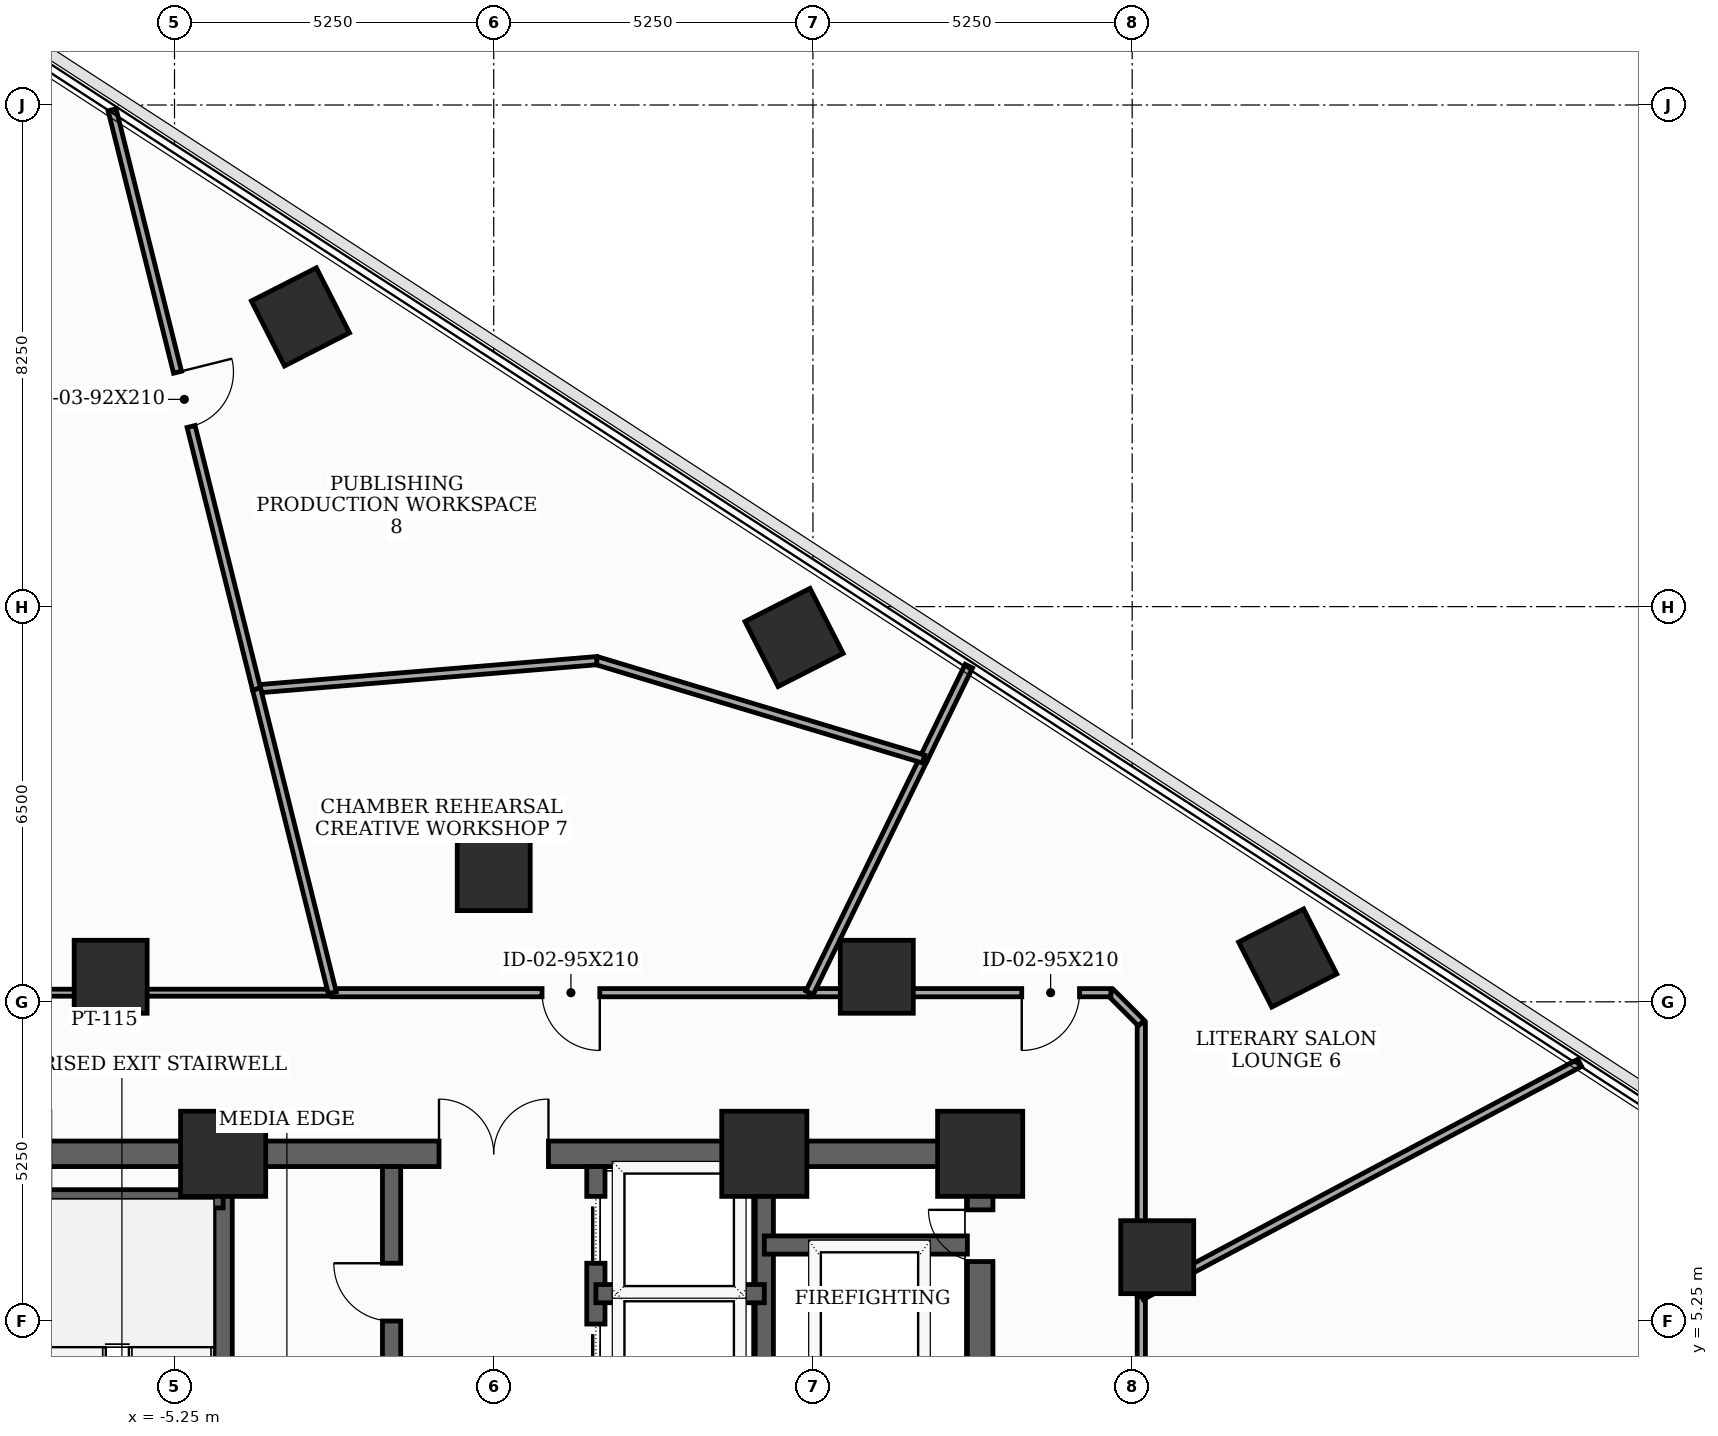
"""IFC4 building model, lengths in metres.
Left out: names, types, materials, properties, quantities, classifications, styles, units other than length and angle.
Written with IfcOpenShell. Run it as: python <this file> out.ifc"""

import sys

from ifc_helpers import new_model, si_unit, direction, frame, frame_2d, origin, origin_2d, place, context, subcontext, project, spatial, rectangle, extrude, element, fill, save


model = new_model("IFC4")
c1 = context("Model", 3, precision=1e-05, world=origin(), true_north=direction((0.0, 1.0)))
c2 = subcontext(c1, "Body", "Model", "MODEL_VIEW")
j1 = project(units=[si_unit("LENGTHUNIT", "METRE"), si_unit("PLANEANGLEUNIT", "RADIAN")], contexts=[c1])
p1 = place(None, origin())
s1 = spatial("IfcSite", under=j1, at=p1, CompositionType="ELEMENT")
p2 = place(p1, origin())
s2 = spatial("IfcBuilding", under=s1, at=p2, CompositionType="ELEMENT")
p3 = place(p2, frame((0.0, 0.0, 131.0)))
s3 = spatial("IfcBuildingStorey", under=s2, at=p3, CompositionType="ELEMENT", Elevation=131.0)
for number, where, z_axis, x_axis in (
    (1, (8.0, 8.0, 0.0), (0.0, 0.0, 1.0), (1.0, 0.0, 0.0)),
    (2, (4.45, 8.0, 0.0), (0.0, 0.0, 1.0), (1.0, 0.0, 0.0)),
    (3, (-4.45, 8.0, 0.0), (0.0, 0.0, 1.0), (1.0, 0.0, 0.0)),
):
    element("IfcColumn", number, at=place(p3, frame(where, z_axis=z_axis, x_axis=x_axis)), inside=s3, PredefinedType="COLUMN", context=c2, shape_type="SweptSolid", body=[
        extrude(rectangle(XDim=1.4, YDim=1.4, at=origin_2d()), origin(), (0.0, 0.0, 1.0), 3.7),
    ])
for number, where, z_axis, x_axis in (
    (4, (10.912, 6.3, 0.0), (0.0, 0.0, 1.0), (1.0, 0.0, 0.0)),
    (5, (6.3, 10.912, 0.0), (0.0, 0.0, 1.0), (1.0, 0.0, 0.0)),
    (6, (0.0, 12.6, 0.0), (0.0, 0.0, 1.0), (1.0, 0.0, 0.0)),
    (7, (-6.3, 10.912, 0.0), (0.0, 0.0, 1.0), (1.0, 0.0, 0.0)),
    (8, (13.058, 11.22, 0.0), (0.0, 0.0, 1.0), (0.891, 0.454, 0.0)),
    (9, (4.939, 16.492, 0.0), (0.0, 0.0, 1.0), (0.891, 0.454, 0.0)),
    (10, (-3.179, 21.765, 0.0), (0.0, 0.0, 1.0), (0.891, 0.454, 0.0)),
):
    element("IfcColumn", number, at=place(p3, frame(where, z_axis=z_axis, x_axis=x_axis)), inside=s3, PredefinedType="COLUMN", context=c2, shape_type="SweptSolid", body=[
        extrude(rectangle(XDim=1.2, YDim=1.2, at=origin_2d()), origin(), (0.0, 0.0, 1.0), 3.7),
    ])
p4 = place(p3, frame((8.0, -8.0, 0.0), z_axis=(0.0, 0.0, 1.0), x_axis=(0.0, 1.0, 0.0)))
e11 = element("IfcWall", 11, at=p4, inside=s3, PredefinedType="SHEAR", context=c2, shape_type="SweptSolid", body=[
    extrude(rectangle(XDim=16.0, YDim=0.42, at=frame_2d((8.0, 0.0))), origin(), (0.0, 0.0, 1.0), 3.5),
])
p5 = place(p4, frame((9.6, 0.0, 0.0)))
e12 = element("IfcOpeningElement", 12, at=p5, cuts=e11, PredefinedType="OPENING", context=c2, shape_type="SweptSolid", body=[
    extrude(rectangle(XDim=1.05, YDim=2.15, at=frame_2d((0.525, 1.075))), frame((0.0, 0.22, 0.0), z_axis=(0.0, -1.0, 0.0), x_axis=(1.0, 0.0, 0.0)), (0.0, 0.0, 1.0), 0.44),
])
p6 = place(p4, frame((14.229, 0.0, 0.0)))
e13 = element("IfcOpeningElement", 13, at=p6, cuts=e11, PredefinedType="OPENING", context=c2, shape_type="SweptSolid", body=[
    extrude(rectangle(XDim=0.85, YDim=2.02, at=frame_2d((0.425, 1.01))), frame((0.0, 0.22, 0.0), z_axis=(0.0, -1.0, 0.0), x_axis=(1.0, 0.0, 0.0)), (0.0, 0.0, 1.0), 0.44),
])
p7 = place(p3, frame((-8.0, 8.0, 0.0), z_axis=(0.0, 0.0, 1.0), x_axis=(1.0, 0.0, 0.0)))
e14 = element("IfcWall", 14, at=p7, inside=s3, PredefinedType="SHEAR", context=c2, shape_type="SweptSolid", body=[
    extrude(rectangle(XDim=16.0, YDim=0.42, at=frame_2d((8.0, 0.0))), origin(), (0.0, 0.0, 1.0), 3.5),
])
p8 = place(p7, frame((7.1, 0.0, 0.0)))
e15 = element("IfcOpeningElement", 15, at=p8, cuts=e14, PredefinedType="OPENING", context=c2, shape_type="SweptSolid", body=[
    extrude(rectangle(XDim=1.8, YDim=2.15, at=frame_2d((0.9, 1.075))), frame((0.0, 0.22, 0.0), z_axis=(0.0, -1.0, 0.0), x_axis=(1.0, 0.0, 0.0)), (0.0, 0.0, 1.0), 0.44),
])
for number, where, z_axis, x_axis in (
    (16, (-4.45, -7.79, 0.0), (0.0, 0.0, 1.0), (0.0, 1.0, 0.0)),
    (17, (4.45, -7.79, 0.0), (0.0, 0.0, 1.0), (0.0, 1.0, 0.0)),
):
    element("IfcWall", number, at=place(p3, frame(where, z_axis=z_axis, x_axis=x_axis)), inside=s3, PredefinedType="SHEAR", context=c2, shape_type="SweptSolid", body=[
        extrude(rectangle(XDim=15.58, YDim=0.3, at=frame_2d((7.79, 0.0))), origin(), (0.0, 0.0, 1.0), 3.5),
    ])
for number, where, z_axis, x_axis in (
    (18, (-7.79, 7.26, 0.0), (0.0, 0.0, 1.0), (1.0, 0.0, 0.0)),
    (19, (4.45, 6.5, 0.0), (0.0, 0.0, 1.0), (1.0, 0.0, 0.0)),
):
    element("IfcWall", number, at=place(p3, frame(where, z_axis=z_axis, x_axis=x_axis)), inside=s3, PredefinedType="SHEAR", context=c2, shape_type="SweptSolid", body=[
        extrude(rectangle(XDim=3.34, YDim=0.3, at=frame_2d((1.67, 0.0))), origin(), (0.0, 0.0, 1.0), 3.5),
    ])
p9 = place(p3, frame((-1.68, -4.85, 0.0), z_axis=(0.0, 0.0, 1.0), x_axis=(0.0, 1.0, 0.0)))
e20 = element("IfcWall", 20, at=p9, inside=s3, PredefinedType="SHEAR", context=c2, shape_type="SweptSolid", body=[
    extrude(rectangle(XDim=12.64, YDim=0.3, at=frame_2d((6.32, 0.0))), origin(), (0.0, 0.0, 1.0), 3.5),
])
p10 = place(p9, frame((1.65, 0.0, 0.0)))
e21 = element("IfcOpeningElement", 21, at=p10, cuts=e20, PredefinedType="OPENING", context=c2, shape_type="SweptSolid", body=[
    extrude(rectangle(XDim=0.95, YDim=2.1, at=frame_2d((0.475, 1.05))), frame((0.0, 0.16, 0.0), z_axis=(0.0, -1.0, 0.0), x_axis=(1.0, 0.0, 0.0)), (0.0, 0.0, 1.0), 0.32),
])
p11 = place(p9, frame((5.9, 0.0, 0.0)))
e22 = element("IfcOpeningElement", 22, at=p11, cuts=e20, PredefinedType="OPENING", context=c2, shape_type="SweptSolid", body=[
    extrude(rectangle(XDim=0.95, YDim=2.1, at=frame_2d((0.475, 1.05))), frame((0.0, 0.16, 0.0), z_axis=(0.0, -1.0, 0.0), x_axis=(1.0, 0.0, 0.0)), (0.0, 0.0, 1.0), 0.32),
])
p12 = place(p9, frame((10.1, 0.0, 0.0)))
e23 = element("IfcOpeningElement", 23, at=p12, cuts=e20, PredefinedType="OPENING", context=c2, shape_type="SweptSolid", body=[
    extrude(rectangle(XDim=0.95, YDim=2.1, at=frame_2d((0.475, 1.05))), frame((0.0, 0.16, 0.0), z_axis=(0.0, -1.0, 0.0), x_axis=(1.0, 0.0, 0.0)), (0.0, 0.0, 1.0), 0.32),
])
p13 = place(p3, frame((1.68, -4.85, 0.0), z_axis=(0.0, 0.0, 1.0), x_axis=(0.0, 1.0, 0.0)))
e24 = element("IfcWall", 24, at=p13, inside=s3, PredefinedType="SHEAR", context=c2, shape_type="SweptSolid", body=[
    extrude(rectangle(XDim=12.64, YDim=0.3, at=frame_2d((6.32, 0.0))), origin(), (0.0, 0.0, 1.0), 3.5),
])
p14 = place(p13, frame((0.55, 0.0, 0.0)))
e25 = element("IfcOpeningElement", 25, at=p14, cuts=e24, PredefinedType="OPENING", context=c2, shape_type="SweptSolid", body=[
    extrude(rectangle(XDim=1.1, YDim=2.1, at=frame_2d((0.55, 1.05))), frame((0.0, 0.16, 0.0), z_axis=(0.0, -1.0, 0.0), x_axis=(1.0, 0.0, 0.0)), (0.0, 0.0, 1.0), 0.32),
])
p15 = place(p13, frame((2.65, 0.0, 0.0)))
e26 = element("IfcOpeningElement", 26, at=p15, cuts=e24, PredefinedType="OPENING", context=c2, shape_type="SweptSolid", body=[
    extrude(rectangle(XDim=1.1, YDim=2.1, at=frame_2d((0.55, 1.05))), frame((0.0, 0.16, 0.0), z_axis=(0.0, -1.0, 0.0), x_axis=(1.0, 0.0, 0.0)), (0.0, 0.0, 1.0), 0.32),
])
p16 = place(p13, frame((4.75, 0.0, 0.0)))
e27 = element("IfcOpeningElement", 27, at=p16, cuts=e24, PredefinedType="OPENING", context=c2, shape_type="SweptSolid", body=[
    extrude(rectangle(XDim=1.1, YDim=2.1, at=frame_2d((0.55, 1.05))), frame((0.0, 0.16, 0.0), z_axis=(0.0, -1.0, 0.0), x_axis=(1.0, 0.0, 0.0)), (0.0, 0.0, 1.0), 0.32),
])
p17 = place(p13, frame((6.85, 0.0, 0.0)))
e28 = element("IfcOpeningElement", 28, at=p17, cuts=e24, PredefinedType="OPENING", context=c2, shape_type="SweptSolid", body=[
    extrude(rectangle(XDim=1.1, YDim=2.1, at=frame_2d((0.55, 1.05))), frame((0.0, 0.16, 0.0), z_axis=(0.0, -1.0, 0.0), x_axis=(1.0, 0.0, 0.0)), (0.0, 0.0, 1.0), 0.32),
])
p18 = place(p13, frame((8.95, 0.0, 0.0)))
e29 = element("IfcOpeningElement", 29, at=p18, cuts=e24, PredefinedType="OPENING", context=c2, shape_type="SweptSolid", body=[
    extrude(rectangle(XDim=1.1, YDim=2.1, at=frame_2d((0.55, 1.05))), frame((0.0, 0.16, 0.0), z_axis=(0.0, -1.0, 0.0), x_axis=(1.0, 0.0, 0.0)), (0.0, 0.0, 1.0), 0.32),
])
p19 = place(p13, frame((11.05, 0.0, 0.0)))
e30 = element("IfcOpeningElement", 30, at=p19, cuts=e24, PredefinedType="OPENING", context=c2, shape_type="SweptSolid", body=[
    extrude(rectangle(XDim=1.1, YDim=2.1, at=frame_2d((0.55, 1.05))), frame((0.0, 0.16, 0.0), z_axis=(0.0, -1.0, 0.0), x_axis=(1.0, 0.0, 0.0)), (0.0, 0.0, 1.0), 0.32),
])
p20 = place(p3, frame((1.68, 5.7, 0.0), z_axis=(0.0, 0.0, 1.0), x_axis=(1.0, 0.0, 0.0)))
e31 = element("IfcWall", 31, at=p20, inside=s3, PredefinedType="SHEAR", context=c2, shape_type="SweptSolid", body=[
    extrude(rectangle(XDim=2.77, YDim=0.3, at=frame_2d((1.385, 0.0))), origin(), (0.0, 0.0, 1.0), 3.5),
])
p21 = place(p3, frame((10.65, -10.15, 0.0), z_axis=(0.0, 0.0, 1.0), x_axis=(0.0, 1.0, 0.0)))
e32 = element("IfcWall", 32, at=p21, inside=s3, PredefinedType="PARTITIONING", context=c2, shape_type="SweptSolid", body=[
    extrude(rectangle(XDim=15.813, YDim=0.135, at=frame_2d((7.906, 0.0))), origin(), (0.0, 0.0, 1.0), 2.785),
])
p22 = place(p21, frame((7.431, 0.0, 0.0)))
e33 = element("IfcOpeningElement", 33, at=p22, cuts=e32, PredefinedType="OPENING", context=c2, shape_type="SweptSolid", body=[
    extrude(rectangle(XDim=0.95, YDim=2.1, at=frame_2d((0.475, 1.05))), frame((0.0, 0.077, 0.0), z_axis=(0.0, -1.0, 0.0), x_axis=(1.0, 0.0, 0.0)), (0.0, 0.0, 1.0), 0.155),
])
p23 = place(p3, frame((10.65, 5.663, 0.0), z_axis=(0.0, 0.0, 1.0), x_axis=(0.0, 1.0, 0.0)))
e34 = element("IfcWall", 34, at=p23, inside=s3, PredefinedType="PARTITIONING", context=c2, shape_type="SweptSolid", body=[
    extrude(rectangle(XDim=4.487, YDim=0.135, at=frame_2d((2.243, 0.0))), origin(), (0.0, 0.0, 1.0), 2.785),
])
p24 = place(p3, frame((10.65, 10.15, 0.0), z_axis=(0.0, 0.0, 1.0), x_axis=(-0.707106781187, 0.707106781187, 0.0)))
e35 = element("IfcWall", 35, at=p24, inside=s3, PredefinedType="PARTITIONING", context=c2, shape_type="SweptSolid", body=[
    extrude(rectangle(XDim=0.707, YDim=0.135, at=frame_2d((0.354, 0.0))), origin(), (0.0, 0.0, 1.0), 3.125),
])
p25 = place(p3, frame((10.15, 10.65, 0.0), z_axis=(0.0, 0.0, 1.0), x_axis=(-1.0, 0.0, 0.0)))
e36 = element("IfcWall", 36, at=p25, inside=s3, PredefinedType="PARTITIONING", context=c2, shape_type="SweptSolid", body=[
    extrude(rectangle(XDim=4.956, YDim=0.135, at=frame_2d((2.478, 0.0))), origin(), (0.0, 0.0, 1.0), 2.785),
])
p26 = place(p25, frame((0.516, 0.0, 0.0)))
e37 = element("IfcOpeningElement", 37, at=p26, cuts=e36, PredefinedType="OPENING", context=c2, shape_type="SweptSolid", body=[
    extrude(rectangle(XDim=0.95, YDim=2.1, at=frame_2d((0.475, 1.05))), frame((0.0, 0.077, 0.0), z_axis=(0.0, -1.0, 0.0), x_axis=(1.0, 0.0, 0.0)), (0.0, 0.0, 1.0), 0.155),
])
p27 = place(p3, frame((5.194, 10.65, 0.0), z_axis=(0.0, 0.0, 1.0), x_axis=(-1.0, 0.0, 0.0)))
e38 = element("IfcWall", 38, at=p27, inside=s3, PredefinedType="PARTITIONING", context=c2, shape_type="SweptSolid", body=[
    extrude(rectangle(XDim=7.849, YDim=0.135, at=frame_2d((3.925, 0.0))), origin(), (0.0, 0.0, 1.0), 2.785),
])
p28 = place(p27, frame((3.449, 0.0, 0.0)))
e39 = element("IfcOpeningElement", 39, at=p28, cuts=e38, PredefinedType="OPENING", context=c2, shape_type="SweptSolid", body=[
    extrude(rectangle(XDim=0.95, YDim=2.1, at=frame_2d((0.475, 1.05))), frame((0.0, 0.077, 0.0), z_axis=(0.0, -1.0, 0.0), x_axis=(1.0, 0.0, 0.0)), (0.0, 0.0, 1.0), 0.155),
])
p29 = place(p3, frame((-2.655, 10.65, 0.0), z_axis=(0.0, 0.0, 1.0), x_axis=(-1.0, 0.0, 0.0)))
e40 = element("IfcWall", 40, at=p29, inside=s3, PredefinedType="PARTITIONING", context=c2, shape_type="SweptSolid", body=[
    extrude(rectangle(XDim=7.495, YDim=0.115, at=frame_2d((3.748, 0.0))), origin(), (0.0, 0.0, 1.0), 2.785),
])
p30 = place(p3, frame((17.86, 9.497, 0.0), z_axis=(0.0, 0.0, 1.0), x_axis=(-0.882966259968, -0.469436453376, 0.0)))
e41 = element("IfcWall", 41, at=p30, inside=s3, PredefinedType="PARTITIONING", context=c2, shape_type="SweptSolid", body=[
    extrude(rectangle(XDim=8.166, YDim=0.135, at=frame_2d((4.083, 0.0))), origin(), (0.0, 0.0, 1.0), 2.785),
])
p31 = place(p3, frame((7.069, 14.493, 0.0), z_axis=(0.0, 0.0, 1.0), x_axis=(-0.438491124388, -0.898735519401, 0.0)))
e42 = element("IfcWall", 42, at=p31, inside=s3, PredefinedType="PARTITIONING", context=c2, shape_type="SweptSolid", body=[
    extrude(rectangle(XDim=4.276, YDim=0.135, at=frame_2d((2.138, 0.0))), origin(), (0.0, 0.0, 1.0), 2.785),
])
p32 = place(p3, frame((7.813, 16.021, 0.0), z_axis=(0.0, 0.0, 1.0), x_axis=(-0.437939658317, -0.899004369107, 0.0)))
e43 = element("IfcWall", 43, at=p32, inside=s3, PredefinedType="PARTITIONING", context=c2, shape_type="SweptSolid", body=[
    extrude(rectangle(XDim=1.7, YDim=0.135, at=frame_2d((0.85, 0.0))), origin(), (0.0, 0.0, 1.0), 2.985),
])
p33 = place(p3, frame((7.069, 14.493, 0.0), z_axis=(0.0, 0.0, 1.0), x_axis=(-0.957562573124, 0.288225464789, 0.0)))
e44 = element("IfcWall", 44, at=p33, inside=s3, PredefinedType="PARTITIONING", context=c2, shape_type="SweptSolid", body=[
    extrude(rectangle(XDim=5.614, YDim=0.135, at=frame_2d((2.807, 0.0))), origin(), (0.0, 0.0, 1.0), 2.885),
])
p34 = place(p3, frame((1.693, 16.111, 0.0), z_axis=(0.0, 0.0, 1.0), x_axis=(-0.996561637531, -0.082854707786, 0.0)))
e45 = element("IfcWall", 45, at=p34, inside=s3, PredefinedType="PARTITIONING", context=c2, shape_type="SweptSolid", body=[
    extrude(rectangle(XDim=5.613, YDim=0.135, at=frame_2d((2.807, 0.0))), origin(), (0.0, 0.0, 1.0), 2.885),
])
p35 = place(p3, frame((-3.901, 15.646, 0.0), z_axis=(0.0, 0.0, 1.0), x_axis=(0.241955453095, -0.970287358836, 0.0)))
e46 = element("IfcWall", 46, at=p35, inside=s3, PredefinedType="PARTITIONING", context=c2, shape_type="SweptSolid", body=[
    extrude(rectangle(XDim=5.149, YDim=0.135, at=frame_2d((2.575, 0.0))), origin(), (0.0, 0.0, 1.0), 2.785),
])
p36 = place(p3, frame((-6.276, 25.171, 0.0), z_axis=(0.0, 0.0, 1.0), x_axis=(0.241962105276, -0.970285699993, 0.0)))
e47 = element("IfcWall", 47, at=p36, inside=s3, PredefinedType="PARTITIONING", context=c2, shape_type="SweptSolid", body=[
    extrude(rectangle(XDim=9.817, YDim=0.135, at=frame_2d((4.908, 0.0))), origin(), (0.0, 0.0, 1.0), 2.985),
])
p37 = place(p36, frame((4.448, 0.0, 0.0)))
e48 = element("IfcOpeningElement", 48, at=p37, cuts=e47, PredefinedType="OPENING", context=c2, shape_type="SweptSolid", body=[
    extrude(rectangle(XDim=0.92, YDim=2.1, at=frame_2d((0.46, 1.05))), frame((0.0, 0.077, 0.0), z_axis=(0.0, -1.0, 0.0), x_axis=(1.0, 0.0, 0.0)), (0.0, 0.0, 1.0), 0.155),
])
p38 = place(p6, origin())
e49 = element("IfcDoor", 49, at=p38, inside=s3, OperationType="SINGLE_SWING_RIGHT", PredefinedType="TRAPDOOR", context=c2, shape_type="SweptSolid", body=[
    extrude(rectangle(XDim=0.85, YDim=2.02, at=frame_2d((0.425, 1.01))), frame((0.0, 0.025, 0.0), z_axis=(0.0, -1.0, 0.0), x_axis=(1.0, 0.0, 0.0)), (0.0, 0.0, 1.0), 0.05),
])
fill(e13, e49)
p39 = place(p8, origin())
e50 = element("IfcDoor", 50, at=p39, inside=s3, OperationType="DOUBLE_DOOR_SINGLE_SWING", PredefinedType="DOOR", context=c2, shape_type="SweptSolid", body=[
    extrude(rectangle(XDim=1.8, YDim=2.15, at=frame_2d((0.9, 1.075))), frame((0.0, 0.025, 0.0), z_axis=(0.0, -1.0, 0.0), x_axis=(1.0, 0.0, 0.0)), (0.0, 0.0, 1.0), 0.05),
])
fill(e15, e50)
p40 = place(p12, origin())
e51 = element("IfcDoor", 51, at=p40, inside=s3, OperationType="SINGLE_SWING_RIGHT", PredefinedType="DOOR", context=c2, shape_type="SweptSolid", body=[
    extrude(rectangle(XDim=0.95, YDim=2.1, at=frame_2d((0.475, 1.05))), frame((0.0, 0.025, 0.0), z_axis=(0.0, -1.0, 0.0), x_axis=(1.0, 0.0, 0.0)), (0.0, 0.0, 1.0), 0.05),
])
fill(e23, e51)
p41 = place(p18, origin())
e52 = element("IfcDoor", 52, at=p41, inside=s3, OperationType="SLIDING_TO_LEFT", PredefinedType="DOOR", context=c2, shape_type="SweptSolid", body=[
    extrude(rectangle(XDim=1.1, YDim=2.1, at=frame_2d((0.55, 1.05))), frame((0.0, 0.025, 0.0), z_axis=(0.0, -1.0, 0.0), x_axis=(1.0, 0.0, 0.0)), (0.0, 0.0, 1.0), 0.05),
])
fill(e29, e52)
p42 = place(p19, origin())
e53 = element("IfcDoor", 53, at=p42, inside=s3, OperationType="SLIDING_TO_LEFT", PredefinedType="DOOR", context=c2, shape_type="SweptSolid", body=[
    extrude(rectangle(XDim=1.1, YDim=2.1, at=frame_2d((0.55, 1.05))), frame((0.0, 0.025, 0.0), z_axis=(0.0, -1.0, 0.0), x_axis=(1.0, 0.0, 0.0)), (0.0, 0.0, 1.0), 0.05),
])
fill(e30, e53)
p43 = place(p26, origin())
e54 = element("IfcDoor", 54, at=p43, inside=s3, OperationType="SINGLE_SWING_RIGHT", PredefinedType="DOOR", context=c2, shape_type="SweptSolid", body=[
    extrude(rectangle(XDim=0.95, YDim=2.1, at=frame_2d((0.475, 1.05))), frame((0.0, 0.025, 0.0), z_axis=(0.0, -1.0, 0.0), x_axis=(1.0, 0.0, 0.0)), (0.0, 0.0, 1.0), 0.05),
])
fill(e37, e54)
p44 = place(p28, origin())
e55 = element("IfcDoor", 55, at=p44, inside=s3, OperationType="SINGLE_SWING_LEFT", PredefinedType="DOOR", context=c2, shape_type="SweptSolid", body=[
    extrude(rectangle(XDim=0.95, YDim=2.1, at=frame_2d((0.475, 1.05))), frame((0.0, 0.025, 0.0), z_axis=(0.0, -1.0, 0.0), x_axis=(1.0, 0.0, 0.0)), (0.0, 0.0, 1.0), 0.05),
])
fill(e39, e55)
p45 = place(p37, origin())
e56 = element("IfcDoor", 56, at=p45, inside=s3, OperationType="SINGLE_SWING_LEFT", PredefinedType="DOOR", context=c2, shape_type="SweptSolid", body=[
    extrude(rectangle(XDim=0.92, YDim=2.1, at=frame_2d((0.46, 1.05))), frame((0.0, 0.025, 0.0), z_axis=(0.0, -1.0, 0.0), x_axis=(1.0, 0.0, 0.0)), (0.0, 0.0, 1.0), 0.05),
])
fill(e48, e56)
save(model, sys.argv[1])
